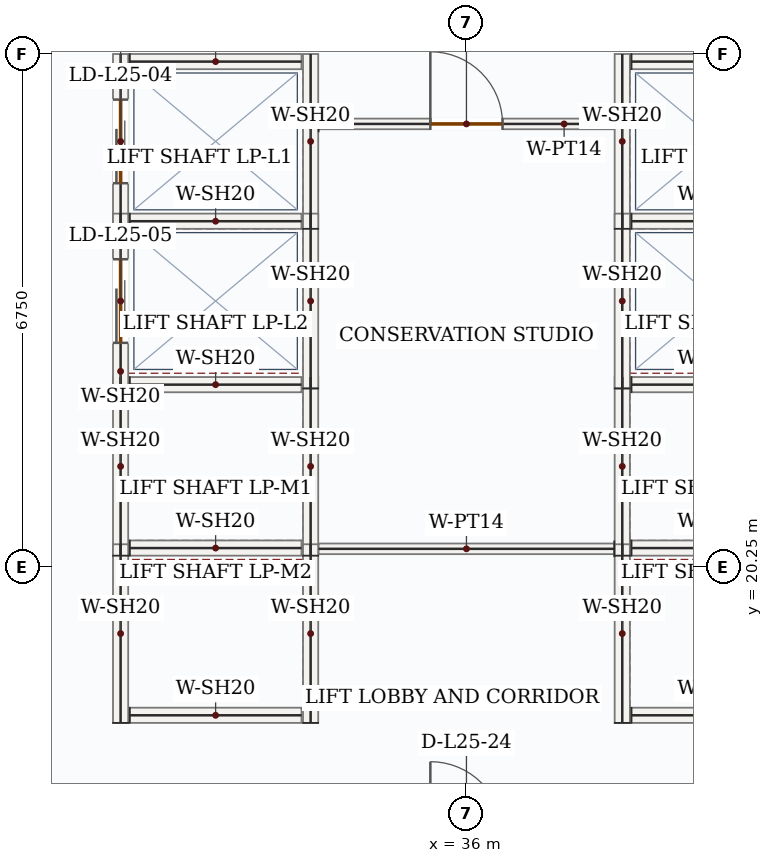
"""IFC4 building model, lengths in metres.
Left out: names, types, materials, properties, quantities, classifications, styles, units other than length and angle.
Written with IfcOpenShell. Run it as: python <this file> out.ifc"""

import sys

from ifc_helpers import new_model, si_unit, direction, frame, frame_2d, origin, place, context, subcontext, project, spatial, rectangle, extrude, source, transform, mapped, element, fill, save


model = new_model("IFC4")
c1 = context("Model", 3, precision=1e-05, world=origin(), true_north=direction((0.0, 1.0)))
c2 = subcontext(c1, "Body", "Model", "MODEL_VIEW")
j1 = project(units=[si_unit("LENGTHUNIT", "METRE"), si_unit("PLANEANGLEUNIT", "RADIAN")], contexts=[c1])
p1 = place(None, origin())
s1 = spatial("IfcSite", under=j1, at=p1, CompositionType="ELEMENT")
p2 = place(p1, origin())
s2 = spatial("IfcBuilding", under=s1, at=p2, CompositionType="ELEMENT")
p3 = place(p2, frame((0.0, 0.0, 113.1)))
s3 = spatial("IfcBuildingStorey", under=s2, at=p3, CompositionType="ELEMENT", Elevation=113.1)
m1 = source(origin(), c2, "Body", "SweptSolid", [
    extrude(rectangle(XDim=2.35, YDim=0.2, at=frame_2d((1.175, 0.0))), origin(), (0.0, 0.0, 1.0), 3.95),
])
for number, where, z_axis, x_axis in (
    (1, (31.45, 20.4, 0.0), (0.0, 0.0, 1.0), (0.0, 1.0, 0.0)),
    (2, (33.95, 20.4, 0.0), (0.0, 0.0, 1.0), (0.0, 1.0, 0.0)),
):
    element("IfcWall", number, at=place(p3, frame(where, z_axis=z_axis, x_axis=x_axis)), inside=s3, PredefinedType="SOLIDWALL", context=c2, shape_type="MappedRepresentation", body=[
        mapped(m1, transform((0.0, 0.0, 0.0), x_axis=(1.0, 0.0, 0.0), y_axis=(0.0, 1.0, 0.0), z_axis=(0.0, 0.0, 1.0), scale=1.0)),
    ])
m2 = source(origin(), c2, "Body", "SweptSolid", [
    extrude(rectangle(XDim=2.26, YDim=0.2, at=frame_2d((1.13, 0.0))), origin(), (0.0, 0.0, 1.0), 3.95),
])
for number, where, z_axis, x_axis in (
    (3, (31.57, 20.5, 0.0), (0.0, 0.0, 1.0), (1.0, 0.0, 0.0)),
    (4, (31.57, 22.65, 0.0), (0.0, 0.0, 1.0), (1.0, 0.0, 0.0)),
):
    element("IfcWall", number, at=place(p3, frame(where, z_axis=z_axis, x_axis=x_axis)), inside=s3, PredefinedType="SOLIDWALL", context=c2, shape_type="MappedRepresentation", body=[
        mapped(m2, transform((0.0, 0.0, 0.0), x_axis=(1.0, 0.0, 0.0), y_axis=(0.0, 1.0, 0.0), z_axis=(0.0, 0.0, 1.0), scale=1.0)),
    ])
for number, where, z_axis, x_axis in (
    (5, (31.45, 18.2, 0.0), (0.0, 0.0, 1.0), (0.0, 1.0, 0.0)),
    (6, (33.95, 18.2, 0.0), (0.0, 0.0, 1.0), (0.0, 1.0, 0.0)),
):
    element("IfcWall", number, at=place(p3, frame(where, z_axis=z_axis, x_axis=x_axis)), inside=s3, PredefinedType="SOLIDWALL", context=c2, shape_type="MappedRepresentation", body=[
        mapped(m1, transform((0.0, 0.0, 0.0), x_axis=(1.0, 0.0, 0.0), y_axis=(0.0, 1.0, 0.0), z_axis=(0.0, 0.0, 1.0), scale=1.0)),
    ])
p4 = place(p3, frame((31.57, 18.3, 0.0), z_axis=(0.0, 0.0, 1.0), x_axis=(1.0, 0.0, 0.0)))
e7 = element("IfcWall", 7, at=p4, inside=s3, PredefinedType="SOLIDWALL", context=c2, shape_type="MappedRepresentation", body=[
    mapped(m2, transform((0.0, 0.0, 0.0), x_axis=(1.0, 0.0, 0.0), y_axis=(0.0, 1.0, 0.0), z_axis=(0.0, 0.0, 1.0), scale=1.0)),
])
p5 = place(p3, frame((38.05, 20.4, 0.0), z_axis=(0.0, 0.0, 1.0), x_axis=(0.0, 1.0, 0.0)))
e8 = element("IfcWall", 8, at=p5, inside=s3, PredefinedType="SOLIDWALL", context=c2, shape_type="MappedRepresentation", body=[
    mapped(m1, transform((0.0, 0.0, 0.0), x_axis=(1.0, 0.0, 0.0), y_axis=(0.0, 1.0, 0.0), z_axis=(0.0, 0.0, 1.0), scale=1.0)),
])
for number, where, z_axis, x_axis in (
    (9, (38.17, 20.5, 0.0), (0.0, 0.0, 1.0), (1.0, 0.0, 0.0)),
    (10, (38.17, 22.65, 0.0), (0.0, 0.0, 1.0), (1.0, 0.0, 0.0)),
):
    element("IfcWall", number, at=place(p3, frame(where, z_axis=z_axis, x_axis=x_axis)), inside=s3, PredefinedType="SOLIDWALL", context=c2, shape_type="MappedRepresentation", body=[
        mapped(m2, transform((0.0, 0.0, 0.0), x_axis=(1.0, 0.0, 0.0), y_axis=(0.0, 1.0, 0.0), z_axis=(0.0, 0.0, 1.0), scale=1.0)),
    ])
p6 = place(p3, frame((38.05, 18.2, 0.0), z_axis=(0.0, 0.0, 1.0), x_axis=(0.0, 1.0, 0.0)))
e11 = element("IfcWall", 11, at=p6, inside=s3, PredefinedType="SOLIDWALL", context=c2, shape_type="MappedRepresentation", body=[
    mapped(m1, transform((0.0, 0.0, 0.0), x_axis=(1.0, 0.0, 0.0), y_axis=(0.0, 1.0, 0.0), z_axis=(0.0, 0.0, 1.0), scale=1.0)),
])
p7 = place(p3, frame((38.17, 18.3, 0.0), z_axis=(0.0, 0.0, 1.0), x_axis=(1.0, 0.0, 0.0)))
e12 = element("IfcWall", 12, at=p7, inside=s3, PredefinedType="SOLIDWALL", context=c2, shape_type="MappedRepresentation", body=[
    mapped(m2, transform((0.0, 0.0, 0.0), x_axis=(1.0, 0.0, 0.0), y_axis=(0.0, 1.0, 0.0), z_axis=(0.0, 0.0, 1.0), scale=1.0)),
])
p8 = place(p3, frame((31.45, 24.7, 0.0), z_axis=(0.0, 0.0, 1.0), x_axis=(0.0, 1.0, 0.0)))
e13 = element("IfcWall", 13, at=p8, inside=s3, PredefinedType="SOLIDWALL", context=c2, shape_type="SweptSolid", body=[
    extrude(rectangle(XDim=2.3, YDim=0.2, at=frame_2d((1.15, 0.0))), origin(), (0.0, 0.0, 1.0), 3.95),
])
p9 = place(p8, frame((0.6, 0.0, 0.0)))
e14 = element("IfcOpeningElement", 14, at=p9, cuts=e13, PredefinedType="OPENING", context=c2, shape_type="SweptSolid", body=[
    extrude(rectangle(XDim=1.1, YDim=2.15, at=frame_2d((0.55, 1.075))), frame((0.0, 0.11, 0.0), z_axis=(0.0, -1.0, 0.0), x_axis=(1.0, 0.0, 0.0)), (0.0, 0.0, 1.0), 0.22),
])
m3 = source(origin(), c2, "Body", "SweptSolid", [
    extrude(rectangle(XDim=2.3, YDim=0.2, at=frame_2d((1.15, 0.0))), origin(), (0.0, 0.0, 1.0), 3.95),
])
p10 = place(p3, frame((33.95, 24.7, 0.0), z_axis=(0.0, 0.0, 1.0), x_axis=(0.0, 1.0, 0.0)))
e15 = element("IfcWall", 15, at=p10, inside=s3, PredefinedType="SOLIDWALL", context=c2, shape_type="MappedRepresentation", body=[
    mapped(m3, transform((0.0, 0.0, 0.0), x_axis=(1.0, 0.0, 0.0), y_axis=(0.0, 1.0, 0.0), z_axis=(0.0, 0.0, 1.0), scale=1.0)),
])
for number, where, z_axis, x_axis in (
    (16, (31.57, 24.8, 0.0), (0.0, 0.0, 1.0), (1.0, 0.0, 0.0)),
    (17, (31.57, 26.9, 0.0), (0.0, 0.0, 1.0), (1.0, 0.0, 0.0)),
):
    element("IfcWall", number, at=place(p3, frame(where, z_axis=z_axis, x_axis=x_axis)), inside=s3, PredefinedType="SOLIDWALL", context=c2, shape_type="MappedRepresentation", body=[
        mapped(m2, transform((0.0, 0.0, 0.0), x_axis=(1.0, 0.0, 0.0), y_axis=(0.0, 1.0, 0.0), z_axis=(0.0, 0.0, 1.0), scale=1.0)),
    ])
p11 = place(p3, frame((31.45, 22.6, 0.0), z_axis=(0.0, 0.0, 1.0), x_axis=(0.0, 1.0, 0.0)))
e18 = element("IfcWall", 18, at=p11, inside=s3, PredefinedType="SOLIDWALL", context=c2, shape_type="SweptSolid", body=[
    extrude(rectangle(XDim=2.3, YDim=0.2, at=frame_2d((1.15, 0.0))), origin(), (0.0, 0.0, 1.0), 3.95),
])
p12 = place(p11, frame((0.6, 0.0, 0.0)))
e19 = element("IfcOpeningElement", 19, at=p12, cuts=e18, PredefinedType="OPENING", context=c2, shape_type="SweptSolid", body=[
    extrude(rectangle(XDim=1.1, YDim=2.15, at=frame_2d((0.55, 1.075))), frame((0.0, 0.11, 0.0), z_axis=(0.0, -1.0, 0.0), x_axis=(1.0, 0.0, 0.0)), (0.0, 0.0, 1.0), 0.22),
])
m4 = source(origin(), c2, "Body", "SweptSolid", [
    extrude(rectangle(XDim=2.3, YDim=0.2, at=frame_2d((1.15, 0.0))), origin(), (0.0, 0.0, 1.0), 3.95),
])
p13 = place(p3, frame((33.95, 22.6, 0.0), z_axis=(0.0, 0.0, 1.0), x_axis=(0.0, 1.0, 0.0)))
e20 = element("IfcWall", 20, at=p13, inside=s3, PredefinedType="SOLIDWALL", context=c2, shape_type="MappedRepresentation", body=[
    mapped(m4, transform((0.0, 0.0, 0.0), x_axis=(1.0, 0.0, 0.0), y_axis=(0.0, 1.0, 0.0), z_axis=(0.0, 0.0, 1.0), scale=1.0)),
])
p14 = place(p3, frame((38.05, 24.7, 0.0), z_axis=(0.0, 0.0, 1.0), x_axis=(0.0, 1.0, 0.0)))
e21 = element("IfcWall", 21, at=p14, inside=s3, PredefinedType="SOLIDWALL", context=c2, shape_type="MappedRepresentation", body=[
    mapped(m3, transform((0.0, 0.0, 0.0), x_axis=(1.0, 0.0, 0.0), y_axis=(0.0, 1.0, 0.0), z_axis=(0.0, 0.0, 1.0), scale=1.0)),
])
for number, where, z_axis, x_axis in (
    (22, (38.17, 24.8, 0.0), (0.0, 0.0, 1.0), (1.0, 0.0, 0.0)),
    (23, (38.17, 26.9, 0.0), (0.0, 0.0, 1.0), (1.0, 0.0, 0.0)),
):
    element("IfcWall", number, at=place(p3, frame(where, z_axis=z_axis, x_axis=x_axis)), inside=s3, PredefinedType="SOLIDWALL", context=c2, shape_type="MappedRepresentation", body=[
        mapped(m2, transform((0.0, 0.0, 0.0), x_axis=(1.0, 0.0, 0.0), y_axis=(0.0, 1.0, 0.0), z_axis=(0.0, 0.0, 1.0), scale=1.0)),
    ])
p15 = place(p3, frame((38.05, 22.6, 0.0), z_axis=(0.0, 0.0, 1.0), x_axis=(0.0, 1.0, 0.0)))
e24 = element("IfcWall", 24, at=p15, inside=s3, PredefinedType="SOLIDWALL", context=c2, shape_type="MappedRepresentation", body=[
    mapped(m4, transform((0.0, 0.0, 0.0), x_axis=(1.0, 0.0, 0.0), y_axis=(0.0, 1.0, 0.0), z_axis=(0.0, 0.0, 1.0), scale=1.0)),
])
p16 = place(p3, frame((34.055, 26.08, 0.0), z_axis=(0.0, 0.0, 1.0), x_axis=(1.0, 0.0, 0.0)))
e25 = element("IfcWall", 25, at=p16, inside=s3, PredefinedType="PARTITIONING", context=c2, shape_type="SweptSolid", body=[
    extrude(rectangle(XDim=3.89, YDim=0.14, at=frame_2d((1.945, 0.0))), origin(), (0.0, 0.0, 1.0), 3.95),
])
p17 = place(p16, frame((1.47, 0.0, 0.0)))
e26 = element("IfcOpeningElement", 26, at=p17, cuts=e25, PredefinedType="OPENING", context=c2, shape_type="SweptSolid", body=[
    extrude(rectangle(XDim=0.95, YDim=2.15, at=frame_2d((0.475, 1.075))), frame((0.0, 0.08, 0.0), z_axis=(0.0, -1.0, 0.0), x_axis=(1.0, 0.0, 0.0)), (0.0, 0.0, 1.0), 0.16),
])
m5 = source(origin(), c2, "Body", "SweptSolid", [
    extrude(rectangle(XDim=3.89, YDim=0.14, at=frame_2d((1.945, 0.0))), origin(), (0.0, 0.0, 1.0), 3.95),
])
p18 = place(p3, frame((37.945, 20.49, 0.0), z_axis=(0.0, 0.0, 1.0), x_axis=(-1.0, 0.0, 0.0)))
e27 = element("IfcWall", 27, at=p18, inside=s3, PredefinedType="PARTITIONING", context=c2, shape_type="MappedRepresentation", body=[
    mapped(m5, transform((0.0, 0.0, 0.0), x_axis=(1.0, 0.0, 0.0), y_axis=(0.0, 1.0, 0.0), z_axis=(0.0, 0.0, 1.0), scale=1.0)),
])
m6 = source(origin(), c2, "Body", "SweptSolid", [
    extrude(rectangle(XDim=1.1, YDim=2.15, at=frame_2d((0.55, 1.075))), frame((0.0, 0.025, 0.0), z_axis=(0.0, -1.0, 0.0), x_axis=(1.0, 0.0, 0.0)), (0.0, 0.0, 1.0), 0.05),
])
p19 = place(p9, origin())
e28 = element("IfcDoor", 28, at=p19, inside=s3, OperationType="DOUBLE_DOOR_SLIDING", PredefinedType="DOOR", context=c2, shape_type="MappedRepresentation", body=[
    mapped(m6, transform((0.0, 0.0, 0.0), x_axis=(1.0, 0.0, 0.0), y_axis=(0.0, 1.0, 0.0), z_axis=(0.0, 0.0, 1.0), scale=1.0)),
])
fill(e14, e28)
p20 = place(p12, origin())
e29 = element("IfcDoor", 29, at=p20, inside=s3, OperationType="DOUBLE_DOOR_SLIDING", PredefinedType="DOOR", context=c2, shape_type="MappedRepresentation", body=[
    mapped(m6, transform((0.0, 0.0, 0.0), x_axis=(1.0, 0.0, 0.0), y_axis=(0.0, 1.0, 0.0), z_axis=(0.0, 0.0, 1.0), scale=1.0)),
])
fill(e19, e29)
m7 = source(origin(), c2, "Body", "SweptSolid", [
    extrude(rectangle(XDim=0.95, YDim=2.15, at=frame_2d((0.475, 1.075))), frame((0.0, 0.025, 0.0), z_axis=(0.0, -1.0, 0.0), x_axis=(1.0, 0.0, 0.0)), (0.0, 0.0, 1.0), 0.05),
])
p21 = place(p17, origin())
e30 = element("IfcDoor", 30, at=p21, inside=s3, OperationType="SINGLE_SWING_LEFT", PredefinedType="DOOR", context=c2, shape_type="MappedRepresentation", body=[
    mapped(m7, transform((0.0, 0.0, 0.0), x_axis=(1.0, 0.0, 0.0), y_axis=(0.0, 1.0, 0.0), z_axis=(0.0, 0.0, 1.0), scale=1.0)),
])
fill(e26, e30)
save(model, sys.argv[1])
